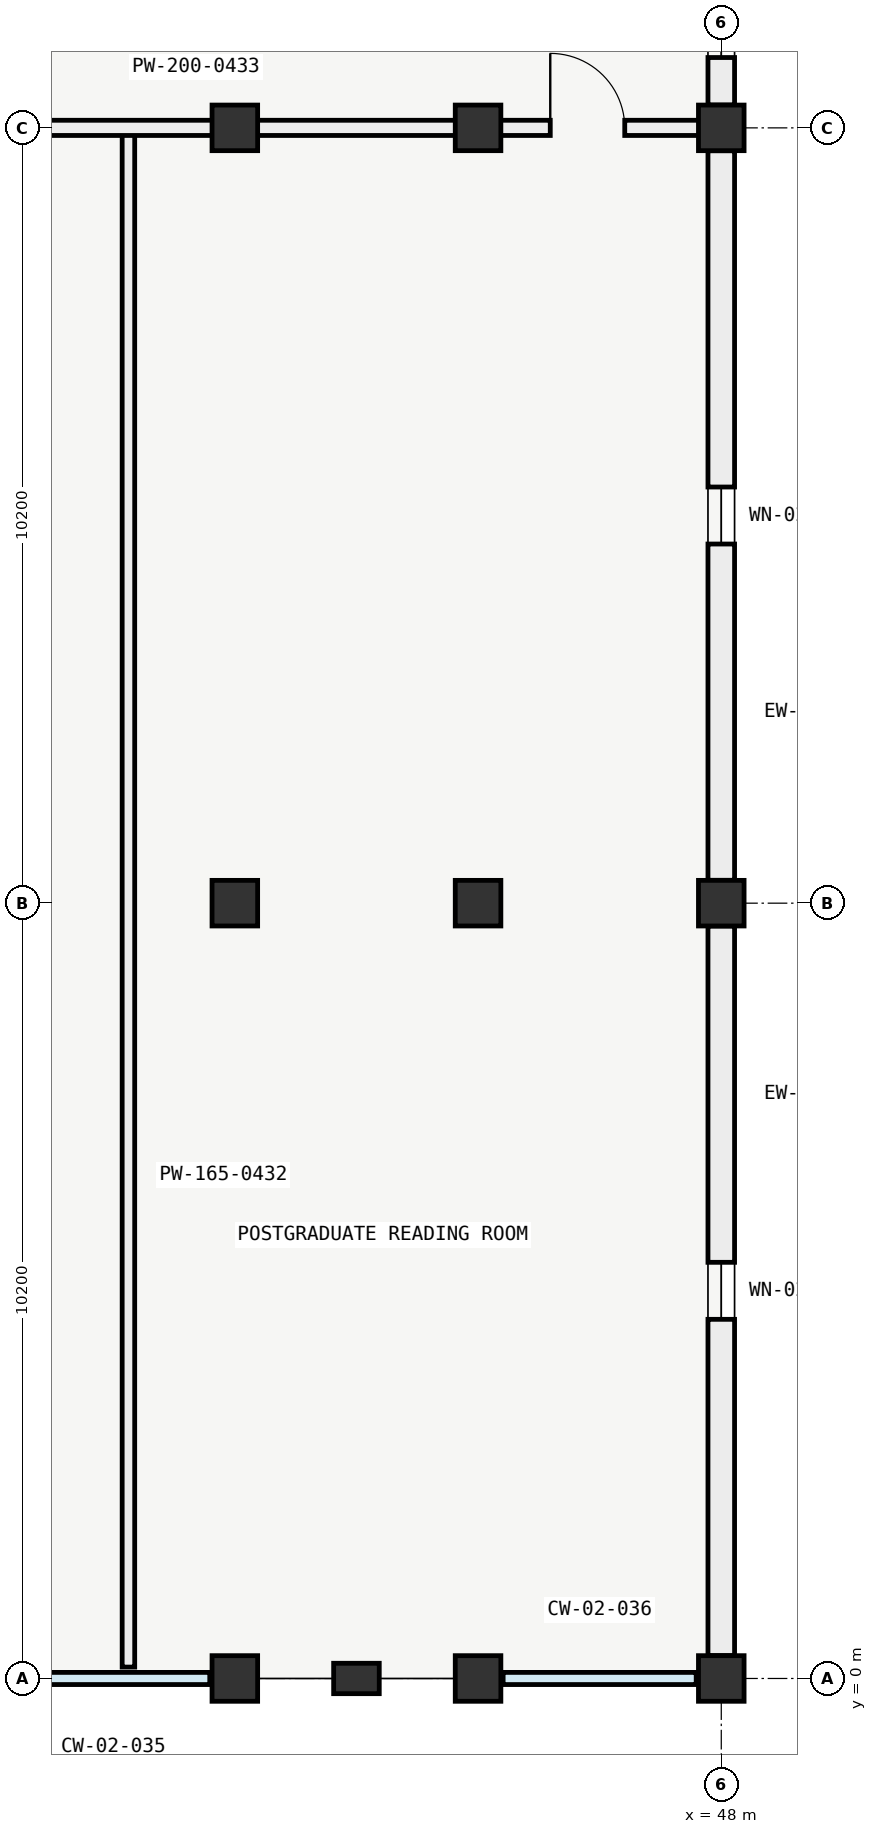
"""IFC4 building model, lengths in metres.
Left out: names, types, materials, properties, quantities, classifications, styles, units other than length and angle.
Written with IfcOpenShell. Run it as: python <this file> out.ifc"""

import sys

from ifc_helpers import new_model, si_unit, direction, frame, frame_2d, origin, origin_2d, place, context, subcontext, project, spatial, rectangle, extrude, element, fill, save


model = new_model("IFC4")
c1 = context("Model", 3, precision=1e-05, world=origin(), true_north=direction((0.0, 1.0)))
c2 = subcontext(c1, "Body", "Model", "MODEL_VIEW")
j1 = project(units=[si_unit("LENGTHUNIT", "METRE"), si_unit("PLANEANGLEUNIT", "RADIAN")], contexts=[c1])
p1 = place(None, origin())
s1 = spatial("IfcSite", under=j1, at=p1, CompositionType="ELEMENT")
p2 = place(p1, origin())
s2 = spatial("IfcBuilding", under=s1, at=p2, CompositionType="ELEMENT")
p3 = place(p2, frame((0.0, 0.0, 18.0)))
s3 = spatial("IfcBuildingStorey", under=s2, at=p3, CompositionType="ELEMENT", Elevation=18.0)
for number, where, z_axis, x_axis in (
    (1, (41.6, 0.0, 0.0), (0.0, 0.0, 1.0), (1.0, 0.0, 0.0)),
    (2, (41.6, 10.2, 0.0), (0.0, 0.0, 1.0), (1.0, 0.0, 0.0)),
    (3, (41.6, 20.4, 0.0), (0.0, 0.0, 1.0), (1.0, 0.0, 0.0)),
    (4, (44.8, 0.0, 0.0), (0.0, 0.0, 1.0), (1.0, 0.0, 0.0)),
    (5, (44.8, 10.2, 0.0), (0.0, 0.0, 1.0), (1.0, 0.0, 0.0)),
    (6, (44.8, 20.4, 0.0), (0.0, 0.0, 1.0), (1.0, 0.0, 0.0)),
    (7, (48.0, 0.0, 0.0), (0.0, 0.0, 1.0), (1.0, 0.0, 0.0)),
    (8, (48.0, 10.2, 0.0), (0.0, 0.0, 1.0), (1.0, 0.0, 0.0)),
    (9, (48.0, 20.4, 0.0), (0.0, 0.0, 1.0), (1.0, 0.0, 0.0)),
):
    element("IfcColumn", number, at=place(p3, frame(where, z_axis=z_axis, x_axis=x_axis)), inside=s3, PredefinedType="COLUMN", context=c2, shape_type="SweptSolid", body=[
        extrude(rectangle(XDim=0.6, YDim=0.6, at=origin_2d()), origin(), (0.0, 0.0, 1.0), 4.2),
    ])
p4 = place(p3, frame((43.2, 0.0, 0.0), z_axis=(0.0, 0.0, 1.0), x_axis=(0.0, 1.0, 0.0)))
e10 = element("IfcColumn", 10, at=p4, inside=s3, PredefinedType="PILASTER", context=c2, shape_type="SweptSolid", body=[
    extrude(rectangle(XDim=0.4, YDim=0.6, at=origin_2d()), origin(), (0.0, 0.0, 1.0), 4.2),
])
p5 = place(p3, frame((48.0, 9.899, 0.0), z_axis=(0.0, 0.0, 1.0), x_axis=(0.0, -1.0, 0.0)))
e11 = element("IfcWall", 11, at=p5, inside=s3, PredefinedType="SOLIDWALL", context=c2, shape_type="SweptSolid", body=[
    extrude(rectangle(XDim=9.598, YDim=0.35, at=frame_2d((4.799, 0.0))), origin(), (0.0, 0.0, 1.0), 2.33),
])
p6 = place(p5, frame((4.424, 0.0, 0.85)))
e12 = element("IfcOpeningElement", 12, at=p6, cuts=e11, PredefinedType="OPENING", context=c2, shape_type="SweptSolid", body=[
    extrude(rectangle(XDim=0.75, YDim=1.1, at=frame_2d((0.375, 0.55))), frame((0.0, 0.185, 0.0), z_axis=(0.0, -1.0, 0.0), x_axis=(1.0, 0.0, 0.0)), (0.0, 0.0, 1.0), 0.37),
])
p7 = place(p3, frame((48.0, 20.099, 0.0), z_axis=(0.0, 0.0, 1.0), x_axis=(0.0, -1.0, 0.0)))
e13 = element("IfcWall", 13, at=p7, inside=s3, PredefinedType="SOLIDWALL", context=c2, shape_type="SweptSolid", body=[
    extrude(rectangle(XDim=9.598, YDim=0.35, at=frame_2d((4.799, 0.0))), origin(), (0.0, 0.0, 1.0), 2.33),
])
p8 = place(p7, frame((4.424, 0.0, 0.85)))
e14 = element("IfcOpeningElement", 14, at=p8, cuts=e13, PredefinedType="OPENING", context=c2, shape_type="SweptSolid", body=[
    extrude(rectangle(XDim=0.75, YDim=1.1, at=frame_2d((0.375, 0.55))), frame((0.0, 0.185, 0.0), z_axis=(0.0, -1.0, 0.0), x_axis=(1.0, 0.0, 0.0)), (0.0, 0.0, 1.0), 0.37),
])
p9 = place(p3, frame((48.0, 23.95, 0.0), z_axis=(0.0, 0.0, 1.0), x_axis=(0.0, -1.0, 0.0)))
e15 = element("IfcWall", 15, at=p9, inside=s3, PredefinedType="SOLIDWALL", context=c2, shape_type="SweptSolid", body=[
    extrude(rectangle(XDim=3.249, YDim=0.35, at=frame_2d((1.625, 0.0))), origin(), (0.0, 0.0, 1.0), 2.33),
])
p10 = place(p9, frame((0.625, 0.0, 0.75)))
e16 = element("IfcOpeningElement", 16, at=p10, cuts=e15, PredefinedType="OPENING", context=c2, shape_type="SweptSolid", body=[
    extrude(rectangle(XDim=2.0, YDim=1.35, at=frame_2d((1.0, 0.675))), frame((0.0, 0.185, 0.0), z_axis=(0.0, -1.0, 0.0), x_axis=(1.0, 0.0, 0.0)), (0.0, 0.0, 1.0), 0.37),
])
p11 = place(p3, frame((40.2, 0.15, 0.0), z_axis=(0.0, 0.0, 1.0), x_axis=(0.0, 1.0, 0.0)))
e17 = element("IfcWall", 17, at=p11, inside=s3, PredefinedType="PARTITIONING", context=c2, shape_type="SweptSolid", body=[
    extrude(rectangle(XDim=20.25, YDim=0.165, at=frame_2d((10.125, 0.0))), origin(), (0.0, 0.0, 1.0), 2.33),
])
p12 = place(p3, frame((35.09, 20.4, 0.0), z_axis=(0.0, 0.0, 1.0), x_axis=(1.0, 0.0, 0.0)))
e18 = element("IfcWall", 18, at=p12, inside=s3, PredefinedType="PARTITIONING", context=c2, shape_type="SweptSolid", body=[
    extrude(rectangle(XDim=12.76, YDim=0.2, at=frame_2d((6.38, 0.0))), origin(), (0.0, 0.0, 1.0), 2.33),
])
p13 = place(p12, frame((0.355, 0.0, 0.0)))
e19 = element("IfcOpeningElement", 19, at=p13, cuts=e18, PredefinedType="OPENING", context=c2, shape_type="SweptSolid", body=[
    extrude(rectangle(XDim=0.98, YDim=2.15, at=frame_2d((0.49, 1.075))), frame((0.0, 0.11, 0.0), z_axis=(0.0, -1.0, 0.0), x_axis=(1.0, 0.0, 0.0)), (0.0, 0.0, 1.0), 0.22),
])
p14 = place(p12, frame((10.66, 0.0, 0.0)))
e20 = element("IfcOpeningElement", 20, at=p14, cuts=e18, PredefinedType="OPENING", context=c2, shape_type="SweptSolid", body=[
    extrude(rectangle(XDim=0.98, YDim=2.15, at=frame_2d((0.49, 1.075))), frame((0.0, 0.11, 0.0), z_axis=(0.0, -1.0, 0.0), x_axis=(1.0, 0.0, 0.0)), (0.0, 0.0, 1.0), 0.22),
])
p15 = place(p6, origin())
e21 = element("IfcWindow", 21, at=p15, inside=s3, PartitioningType="SINGLE_PANEL", PredefinedType="WINDOW", context=c2, shape_type="SweptSolid", body=[
    extrude(rectangle(XDim=0.75, YDim=1.1, at=frame_2d((0.375, 0.55))), frame((0.0, 0.03, 0.0), z_axis=(0.0, -1.0, 0.0), x_axis=(1.0, 0.0, 0.0)), (0.0, 0.0, 1.0), 0.06),
])
fill(e12, e21)
p16 = place(p8, origin())
e22 = element("IfcWindow", 22, at=p16, inside=s3, PartitioningType="SINGLE_PANEL", PredefinedType="WINDOW", context=c2, shape_type="SweptSolid", body=[
    extrude(rectangle(XDim=0.75, YDim=1.1, at=frame_2d((0.375, 0.55))), frame((0.0, 0.03, 0.0), z_axis=(0.0, -1.0, 0.0), x_axis=(1.0, 0.0, 0.0)), (0.0, 0.0, 1.0), 0.06),
])
fill(e14, e22)
p17 = place(p10, origin())
e23 = element("IfcWindow", 23, at=p17, inside=s3, PartitioningType="SINGLE_PANEL", PredefinedType="WINDOW", context=c2, shape_type="SweptSolid", body=[
    extrude(rectangle(XDim=2.0, YDim=1.35, at=frame_2d((1.0, 0.675))), frame((0.0, 0.03, 0.0), z_axis=(0.0, -1.0, 0.0), x_axis=(1.0, 0.0, 0.0)), (0.0, 0.0, 1.0), 0.06),
])
fill(e16, e23)
p18 = place(p14, origin())
e24 = element("IfcDoor", 24, at=p18, inside=s3, OperationType="SINGLE_SWING_LEFT", PredefinedType="DOOR", context=c2, shape_type="SweptSolid", body=[
    extrude(rectangle(XDim=0.98, YDim=2.15, at=frame_2d((0.49, 1.075))), frame((0.0, 0.025, 0.0), z_axis=(0.0, -1.0, 0.0), x_axis=(1.0, 0.0, 0.0)), (0.0, 0.0, 1.0), 0.05),
])
fill(e20, e24)
save(model, sys.argv[1])
